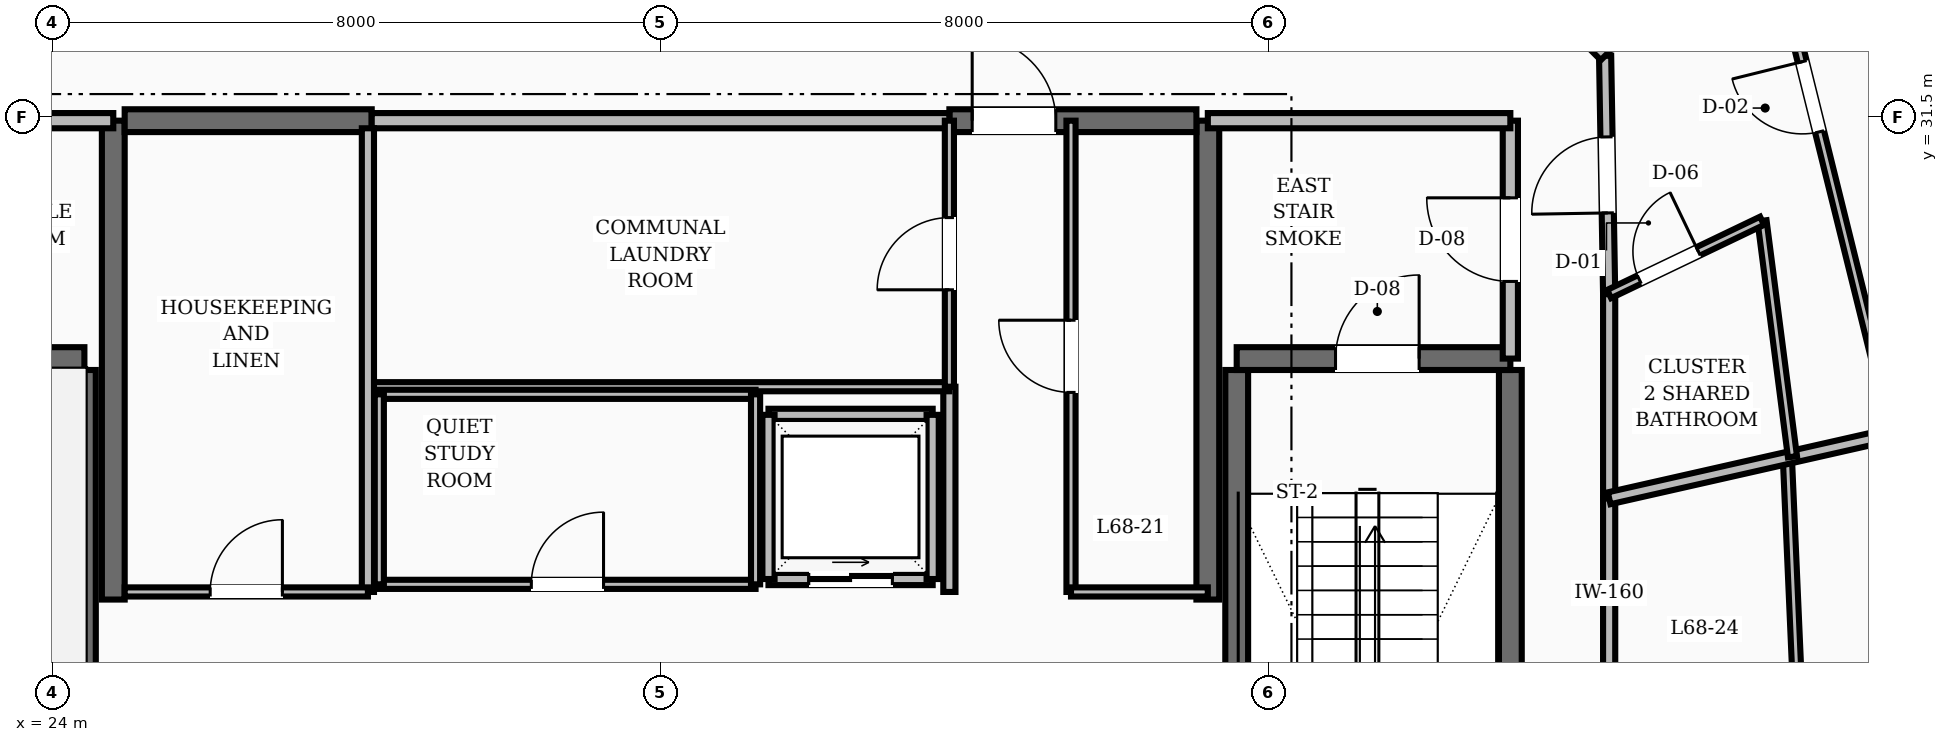
"""IFC4 building model, lengths in metres.
Left out: names, types, materials, properties, quantities, classifications, styles, units other than length and angle.
Written with IfcOpenShell. Run it as: python <this file> out.ifc"""

import sys

from ifc_helpers import new_model, si_unit, direction, frame, frame_2d, origin, place, context, subcontext, project, spatial, rectangle, extrude, element, fill, save


model = new_model("IFC4")
c1 = context("Model", 3, precision=1e-05, world=origin(), true_north=direction((0.0, 1.0)))
c2 = subcontext(c1, "Body", "Model", "MODEL_VIEW")
j1 = project(units=[si_unit("LENGTHUNIT", "METRE"), si_unit("PLANEANGLEUNIT", "RADIAN")], contexts=[c1])
p1 = place(None, origin())
s1 = spatial("IfcSite", under=j1, at=p1, CompositionType="ELEMENT")
p2 = place(p1, origin())
s2 = spatial("IfcBuilding", under=s1, at=p2, CompositionType="ELEMENT")
p3 = place(p2, frame((0.0, 0.0, 261.6)))
s3 = spatial("IfcBuildingStorey", under=s2, at=p3, CompositionType="ELEMENT", Elevation=261.6)
for number, where, z_axis, x_axis in (
    (1, (24.8, 25.15, 0.0), (0.0, 0.0, 1.0), (0.0, 1.0, 0.0)),
    (2, (39.2, 25.15, 0.0), (0.0, 0.0, 1.0), (0.0, 1.0, 0.0)),
):
    element("IfcWall", number, at=place(p3, frame(where, z_axis=z_axis, x_axis=x_axis)), inside=s3, PredefinedType="SHEAR", context=c2, shape_type="SweptSolid", body=[
        extrude(rectangle(XDim=6.3, YDim=0.3, at=frame_2d((3.15, 0.0))), origin(), (0.0, 0.0, 1.0), 3.6),
    ])
p4 = place(p3, frame((24.95, 31.45, 0.0), z_axis=(0.0, 0.0, 1.0), x_axis=(1.0, 0.0, 0.0)))
e3 = element("IfcWall", 3, at=p4, inside=s3, PredefinedType="SHEAR", context=c2, shape_type="SweptSolid", body=[
    extrude(rectangle(XDim=3.25, YDim=0.3, at=frame_2d((1.625, 0.0))), origin(), (0.0, 0.0, 1.0), 3.6),
])
p5 = place(p3, frame((35.8, 31.45, 0.0), z_axis=(0.0, 0.0, 1.0), x_axis=(1.0, 0.0, 0.0)))
e4 = element("IfcWall", 4, at=p5, inside=s3, PredefinedType="SHEAR", context=c2, shape_type="SweptSolid", body=[
    extrude(rectangle(XDim=3.25, YDim=0.3, at=frame_2d((1.625, 0.0))), origin(), (0.0, 0.0, 1.0), 3.6),
])
p6 = place(p5, frame((0.3, 0.0, 0.0)))
e5 = element("IfcOpeningElement", 5, at=p6, cuts=e4, PredefinedType="OPENING", context=c2, shape_type="SweptSolid", body=[
    extrude(rectangle(XDim=1.1, YDim=2.1, at=frame_2d((0.55, 1.05))), frame((0.0, 0.16, 0.0), z_axis=(0.0, -1.0, 0.0), x_axis=(1.0, 0.0, 0.0)), (0.0, 0.0, 1.0), 0.32),
])
p7 = place(p3, frame((24.42, 19.43, 0.0), z_axis=(0.0, 0.0, 1.0), x_axis=(0.0, 1.0, 0.0)))
e6 = element("IfcWall", 6, at=p7, inside=s3, PredefinedType="SHEAR", context=c2, shape_type="SweptSolid", body=[
    extrude(rectangle(XDim=8.74, YDim=0.3, at=frame_2d((4.37, 0.0))), origin(), (0.0, 0.0, 1.0), 3.6),
])
p8 = place(p3, frame((20.82, 28.32, 0.0), z_axis=(0.0, 0.0, 1.0), x_axis=(1.0, 0.0, 0.0)))
e7 = element("IfcWall", 7, at=p8, inside=s3, PredefinedType="SHEAR", context=c2, shape_type="SweptSolid", body=[
    extrude(rectangle(XDim=3.6, YDim=0.3, at=frame_2d((1.8, 0.0))), origin(), (0.0, 0.0, 1.0), 3.6),
])
for number, where, z_axis, x_axis in (
    (8, (43.18, 19.43, 0.0), (0.0, 0.0, 1.0), (0.0, 1.0, 0.0)),
    (9, (39.58, 19.43, 0.0), (0.0, 0.0, 1.0), (0.0, 1.0, 0.0)),
):
    element("IfcWall", number, at=place(p3, frame(where, z_axis=z_axis, x_axis=x_axis)), inside=s3, PredefinedType="SHEAR", context=c2, shape_type="SweptSolid", body=[
        extrude(rectangle(XDim=8.74, YDim=0.3, at=frame_2d((4.37, 0.0))), origin(), (0.0, 0.0, 1.0), 3.6),
    ])
p9 = place(p3, frame((39.58, 28.32, 0.0), z_axis=(0.0, 0.0, 1.0), x_axis=(1.0, 0.0, 0.0)))
e10 = element("IfcWall", 10, at=p9, inside=s3, PredefinedType="SHEAR", context=c2, shape_type="SweptSolid", body=[
    extrude(rectangle(XDim=3.6, YDim=0.3, at=frame_2d((1.8, 0.0))), origin(), (0.0, 0.0, 1.0), 3.6),
])
p10 = place(p9, frame((1.3, 0.0, 0.0)))
e11 = element("IfcOpeningElement", 11, at=p10, cuts=e10, PredefinedType="OPENING", context=c2, shape_type="SweptSolid", body=[
    extrude(rectangle(XDim=1.1, YDim=2.1, at=frame_2d((0.55, 1.05))), frame((0.0, 0.16, 0.0), z_axis=(0.0, -1.0, 0.0), x_axis=(1.0, 0.0, 0.0)), (0.0, 0.0, 1.0), 0.32),
])
p11 = place(p3, frame((43.18, 28.32, 0.0), z_axis=(0.0, 0.0, 1.0), x_axis=(0.0, 1.0, 0.0)))
e12 = element("IfcWall", 12, at=p11, inside=s3, PredefinedType="SOLIDWALL", context=c2, shape_type="SweptSolid", body=[
    extrude(rectangle(XDim=3.13, YDim=0.2, at=frame_2d((1.565, 0.0))), origin(), (0.0, 0.0, 1.0), 2.87),
])
p12 = place(p11, frame((1.015, 0.0, 0.0)))
e13 = element("IfcOpeningElement", 13, at=p12, cuts=e12, PredefinedType="OPENING", context=c2, shape_type="SweptSolid", body=[
    extrude(rectangle(XDim=1.1, YDim=2.1, at=frame_2d((0.55, 1.05))), frame((0.0, 0.11, 0.0), z_axis=(0.0, -1.0, 0.0), x_axis=(1.0, 0.0, 0.0)), (0.0, 0.0, 1.0), 0.22),
])
for number, where, z_axis, x_axis in (
    (14, (39.2, 31.45, 0.0), (0.0, 0.0, 1.0), (1.0, 0.0, 0.0)),
    (15, (20.82, 31.45, 0.0), (0.0, 0.0, 1.0), (1.0, 0.0, 0.0)),
):
    element("IfcWall", number, at=place(p3, frame(where, z_axis=z_axis, x_axis=x_axis)), inside=s3, PredefinedType="SOLIDWALL", context=c2, shape_type="SweptSolid", body=[
        extrude(rectangle(XDim=3.98, YDim=0.2, at=frame_2d((1.99, 0.0))), origin(), (0.0, 0.0, 1.0), 2.87),
    ])
p13 = place(p3, frame((35.8, 25.25, 0.0), z_axis=(0.0, 0.0, 1.0), x_axis=(0.0, 1.0, 0.0)))
e16 = element("IfcWall", 16, at=p13, inside=s3, PredefinedType="SOLIDWALL", context=c2, shape_type="SweptSolid", body=[
    extrude(rectangle(XDim=2.7, YDim=0.16, at=frame_2d((1.35, 0.0))), origin(), (0.0, 0.0, 1.0), 2.87),
])
p14 = place(p3, frame((33.42, 25.42, 0.0), z_axis=(0.0, 0.0, 1.0), x_axis=(1.0, 0.0, 0.0)))
e17 = element("IfcWall", 17, at=p14, inside=s3, PredefinedType="SOLIDWALL", context=c2, shape_type="SweptSolid", body=[
    extrude(rectangle(XDim=2.16, YDim=0.16, at=frame_2d((1.08, 0.0))), origin(), (0.0, 0.0, 1.0), 2.87),
])
p15 = place(p14, frame((0.53, 0.0, 0.0)))
e18 = element("IfcOpeningElement", 18, at=p15, cuts=e17, PredefinedType="OPENING", context=c2, shape_type="SweptSolid", body=[
    extrude(rectangle(XDim=1.1, YDim=2.15, at=frame_2d((0.55, 1.075))), frame((0.0, 0.09, 0.0), z_axis=(0.0, -1.0, 0.0), x_axis=(1.0, 0.0, 0.0)), (0.0, 0.0, 1.0), 0.18),
])
for number, where, z_axis, x_axis in (
    (19, (33.42, 27.58, 0.0), (0.0, 0.0, 1.0), (1.0, 0.0, 0.0)),
    (20, (33.42, 25.42, 0.0), (0.0, 0.0, 1.0), (0.0, 1.0, 0.0)),
    (21, (35.58, 25.42, 0.0), (0.0, 0.0, 1.0), (0.0, 1.0, 0.0)),
):
    element("IfcWall", number, at=place(p3, frame(where, z_axis=z_axis, x_axis=x_axis)), inside=s3, PredefinedType="SOLIDWALL", context=c2, shape_type="SweptSolid", body=[
        extrude(rectangle(XDim=2.16, YDim=0.16, at=frame_2d((1.08, 0.0))), origin(), (0.0, 0.0, 1.0), 2.87),
    ])
p16 = place(p3, frame((28.2, 31.45, 0.0), z_axis=(0.0, 0.0, 1.0), x_axis=(1.0, 0.0, 0.0)))
e22 = element("IfcWall", 22, at=p16, inside=s3, PredefinedType="SOLIDWALL", context=c2, shape_type="SweptSolid", body=[
    extrude(rectangle(XDim=7.6, YDim=0.2, at=frame_2d((3.8, 0.0))), origin(), (0.0, 0.0, 1.0), 2.87),
])
p17 = place(p3, frame((28.2, 27.95, 0.0), z_axis=(0.0, 0.0, 1.0), x_axis=(1.0, 0.0, 0.0)))
e23 = element("IfcWall", 23, at=p17, inside=s3, PredefinedType="PARTITIONING", context=c2, shape_type="SweptSolid", body=[
    extrude(rectangle(XDim=7.6, YDim=0.12, at=frame_2d((3.8, 0.0))), origin(), (0.0, 0.0, 1.0), 2.87),
])
p18 = place(p3, frame((35.8, 27.95, 0.0), z_axis=(0.0, 0.0, 1.0), x_axis=(0.0, 1.0, 0.0)))
e24 = element("IfcWall", 24, at=p18, inside=s3, PredefinedType="PARTITIONING", context=c2, shape_type="SweptSolid", body=[
    extrude(rectangle(XDim=3.5, YDim=0.12, at=frame_2d((1.75, 0.0))), origin(), (0.0, 0.0, 1.0), 2.87),
])
p19 = place(p18, frame((1.275, 0.0, 0.0)))
e25 = element("IfcOpeningElement", 25, at=p19, cuts=e24, PredefinedType="OPENING", context=c2, shape_type="SweptSolid", body=[
    extrude(rectangle(XDim=0.95, YDim=2.1, at=frame_2d((0.475, 1.05))), frame((0.0, 0.07, 0.0), z_axis=(0.0, -1.0, 0.0), x_axis=(1.0, 0.0, 0.0)), (0.0, 0.0, 1.0), 0.14),
])
p20 = place(p3, frame((28.3, 25.35, 0.0), z_axis=(0.0, 0.0, 1.0), x_axis=(1.0, 0.0, 0.0)))
e26 = element("IfcWall", 26, at=p20, inside=s3, PredefinedType="PARTITIONING", context=c2, shape_type="SweptSolid", body=[
    extrude(rectangle(XDim=4.95, YDim=0.12, at=frame_2d((2.475, 0.0))), origin(), (0.0, 0.0, 1.0), 2.87),
])
p21 = place(p20, frame((2.0, 0.0, 0.0)))
e27 = element("IfcOpeningElement", 27, at=p21, cuts=e26, PredefinedType="OPENING", context=c2, shape_type="SweptSolid", body=[
    extrude(rectangle(XDim=0.95, YDim=2.1, at=frame_2d((0.475, 1.05))), frame((0.0, 0.07, 0.0), z_axis=(0.0, -1.0, 0.0), x_axis=(1.0, 0.0, 0.0)), (0.0, 0.0, 1.0), 0.14),
])
p22 = place(p3, frame((28.3, 27.85, 0.0), z_axis=(0.0, 0.0, 1.0), x_axis=(1.0, 0.0, 0.0)))
e28 = element("IfcWall", 28, at=p22, inside=s3, PredefinedType="PARTITIONING", context=c2, shape_type="SweptSolid", body=[
    extrude(rectangle(XDim=4.95, YDim=0.12, at=frame_2d((2.475, 0.0))), origin(), (0.0, 0.0, 1.0), 2.87),
])
for number, where, z_axis, x_axis in (
    (29, (28.3, 25.35, 0.0), (0.0, 0.0, 1.0), (0.0, 1.0, 0.0)),
    (30, (33.25, 25.35, 0.0), (0.0, 0.0, 1.0), (0.0, 1.0, 0.0)),
):
    element("IfcWall", number, at=place(p3, frame(where, z_axis=z_axis, x_axis=x_axis)), inside=s3, PredefinedType="PARTITIONING", context=c2, shape_type="SweptSolid", body=[
        extrude(rectangle(XDim=2.5, YDim=0.12, at=frame_2d((1.25, 0.0))), origin(), (0.0, 0.0, 1.0), 2.87),
    ])
p23 = place(p3, frame((28.15, 25.25, 0.0), z_axis=(0.0, 0.0, 1.0), x_axis=(0.0, 1.0, 0.0)))
e31 = element("IfcWall", 31, at=p23, inside=s3, PredefinedType="SOLIDWALL", context=c2, shape_type="SweptSolid", body=[
    extrude(rectangle(XDim=6.1, YDim=0.16, at=frame_2d((3.05, 0.0))), origin(), (0.0, 0.0, 1.0), 2.87),
])
p24 = place(p3, frame((24.95, 25.25, 0.0), z_axis=(0.0, 0.0, 1.0), x_axis=(1.0, 0.0, 0.0)))
e32 = element("IfcWall", 32, at=p24, inside=s3, PredefinedType="PARTITIONING", context=c2, shape_type="SweptSolid", body=[
    extrude(rectangle(XDim=3.2, YDim=0.12, at=frame_2d((1.6, 0.0))), origin(), (0.0, 0.0, 1.0), 2.87),
])
p25 = place(p24, frame((1.125, 0.0, 0.0)))
e33 = element("IfcOpeningElement", 33, at=p25, cuts=e32, PredefinedType="OPENING", context=c2, shape_type="SweptSolid", body=[
    extrude(rectangle(XDim=0.95, YDim=2.1, at=frame_2d((0.475, 1.05))), frame((0.0, 0.07, 0.0), z_axis=(0.0, -1.0, 0.0), x_axis=(1.0, 0.0, 0.0)), (0.0, 0.0, 1.0), 0.14),
])
p26 = place(p3, frame((37.4, 25.25, 0.0), z_axis=(0.0, 0.0, 1.0), x_axis=(0.0, 1.0, 0.0)))
e34 = element("IfcWall", 34, at=p26, inside=s3, PredefinedType="PARTITIONING", context=c2, shape_type="SweptSolid", body=[
    extrude(rectangle(XDim=6.2, YDim=0.12, at=frame_2d((3.1, 0.0))), origin(), (0.0, 0.0, 1.0), 2.87),
])
p27 = place(p26, frame((2.625, 0.0, 0.0)))
e35 = element("IfcOpeningElement", 35, at=p27, cuts=e34, PredefinedType="OPENING", context=c2, shape_type="SweptSolid", body=[
    extrude(rectangle(XDim=0.95, YDim=2.1, at=frame_2d((0.475, 1.05))), frame((0.0, 0.07, 0.0), z_axis=(0.0, -1.0, 0.0), x_axis=(1.0, 0.0, 0.0)), (0.0, 0.0, 1.0), 0.14),
])
p28 = place(p3, frame((37.4, 25.25, 0.0), z_axis=(0.0, 0.0, 1.0), x_axis=(1.0, 0.0, 0.0)))
e36 = element("IfcWall", 36, at=p28, inside=s3, PredefinedType="PARTITIONING", context=c2, shape_type="SweptSolid", body=[
    extrude(rectangle(XDim=1.8, YDim=0.12, at=frame_2d((0.9, 0.0))), origin(), (0.0, 0.0, 1.0), 2.87),
])
p29 = place(p3, frame((44.48, 24.0, 0.0), z_axis=(0.0, 0.0, 1.0), x_axis=(0.0, 1.0, 0.0)))
e37 = element("IfcWall", 37, at=p29, inside=s3, PredefinedType="SOLIDWALL", context=c2, shape_type="SweptSolid", body=[
    extrude(rectangle(XDim=2.482, YDim=0.16, at=frame_2d((1.241, 0.0))), origin(), (0.0, 0.0, 1.0), 2.87),
])
p30 = place(p3, frame((44.48, 26.482, 0.0), z_axis=(0.0, 0.0, 1.0), x_axis=(0.0, 1.0, 0.0)))
e38 = element("IfcWall", 38, at=p30, inside=s3, PredefinedType="SOLIDWALL", context=c2, shape_type="SweptSolid", body=[
    extrude(rectangle(XDim=2.687, YDim=0.16, at=frame_2d((1.344, 0.0))), origin(), (0.0, 0.0, 1.0), 2.87),
])
p31 = place(p3, frame((44.48, 29.169, 0.0), z_axis=(0.0, 0.0, 1.0), x_axis=(-0.016981035134, 0.999855811828, 0.0)))
e39 = element("IfcWall", 39, at=p31, inside=s3, PredefinedType="SOLIDWALL", context=c2, shape_type="SweptSolid", body=[
    extrude(rectangle(XDim=3.134, YDim=0.16, at=frame_2d((1.567, 0.0))), origin(), (0.0, 0.0, 1.0), 2.87),
])
p32 = place(p31, frame((1.067, 0.0, 0.0)))
e40 = element("IfcOpeningElement", 40, at=p32, cuts=e39, PredefinedType="OPENING", context=c2, shape_type="SweptSolid", body=[
    extrude(rectangle(XDim=1.0, YDim=2.1, at=frame_2d((0.5, 1.05))), frame((0.0, 0.09, 0.0), z_axis=(0.0, -1.0, 0.0), x_axis=(1.0, 0.0, 0.0)), (0.0, 0.0, 1.0), 0.18),
])
p33 = place(p3, frame((44.427, 32.303, 0.0), z_axis=(0.0, 0.0, 1.0), x_axis=(-0.707106781187, 0.707106781187, 0.0)))
e41 = element("IfcWall", 41, at=p33, inside=s3, PredefinedType="SOLIDWALL", context=c2, shape_type="SweptSolid", body=[
    extrude(rectangle(XDim=2.916, YDim=0.16, at=frame_2d((1.458, 0.0))), origin(), (0.0, 0.0, 1.0), 2.87),
])
p34 = place(p3, frame((46.956, 24.0, 0.0), z_axis=(0.0, 0.0, 1.0), x_axis=(-0.043626899023, 0.999047893587, 0.0)))
e42 = element("IfcWall", 42, at=p34, inside=s3, PredefinedType="PARTITIONING", context=c2, shape_type="SweptSolid", body=[
    extrude(rectangle(XDim=3.016, YDim=0.12, at=frame_2d((1.508, 0.0))), origin(), (0.0, 0.0, 1.0), 2.87),
])
p35 = place(p3, frame((44.48, 26.482, 0.0), z_axis=(0.0, 0.0, 1.0), x_axis=(0.975303841196, 0.220867420298, 0.0)))
e43 = element("IfcWall", 43, at=p35, inside=s3, PredefinedType="SOLIDWALL", context=c2, shape_type="SweptSolid", body=[
    extrude(rectangle(XDim=6.819, YDim=0.16, at=frame_2d((3.41, 0.0))), origin(), (0.0, 0.0, 1.0), 2.87),
])
p36 = place(p3, frame((46.892, 27.029, 0.0), z_axis=(0.0, 0.0, 1.0), x_axis=(-0.127998561857, 0.991774353451, 0.0)))
e44 = element("IfcWall", 44, at=p36, inside=s3, PredefinedType="PARTITIONING", context=c2, shape_type="SweptSolid", body=[
    extrude(rectangle(XDim=3.13, YDim=0.12, at=frame_2d((1.565, 0.0))), origin(), (0.0, 0.0, 1.0), 2.87),
])
p37 = place(p3, frame((44.48, 29.169, 0.0), z_axis=(0.0, 0.0, 1.0), x_axis=(0.901874681434, 0.431997753452, 0.0)))
e45 = element("IfcWall", 45, at=p37, inside=s3, PredefinedType="PARTITIONING", context=c2, shape_type="SweptSolid", body=[
    extrude(rectangle(XDim=2.23, YDim=0.12, at=frame_2d((1.115, 0.0))), origin(), (0.0, 0.0, 1.0), 2.87),
])
p38 = place(p37, frame((0.44, 0.0, 0.0)))
e46 = element("IfcOpeningElement", 46, at=p38, cuts=e45, PredefinedType="OPENING", context=c2, shape_type="SweptSolid", body=[
    extrude(rectangle(XDim=0.86, YDim=2.1, at=frame_2d((0.43, 1.05))), frame((0.0, 0.07, 0.0), z_axis=(0.0, -1.0, 0.0), x_axis=(1.0, 0.0, 0.0)), (0.0, 0.0, 1.0), 0.14),
])
p39 = place(p3, frame((48.232, 27.332, 0.0), z_axis=(0.0, 0.0, 1.0), x_axis=(-0.240321088177, 0.970693450363, 0.0)))
e47 = element("IfcWall", 47, at=p39, inside=s3, PredefinedType="PARTITIONING", context=c2, shape_type="SweptSolid", body=[
    extrude(rectangle(XDim=6.902, YDim=0.12, at=frame_2d((3.451, 0.0))), origin(), (0.0, 0.0, 1.0), 2.87),
])
p40 = place(p39, frame((4.092, 0.0, 0.0)))
e48 = element("IfcOpeningElement", 48, at=p40, cuts=e47, PredefinedType="OPENING", context=c2, shape_type="SweptSolid", body=[
    extrude(rectangle(XDim=0.95, YDim=2.1, at=frame_2d((0.475, 1.05))), frame((0.0, 0.07, 0.0), z_axis=(0.0, -1.0, 0.0), x_axis=(1.0, 0.0, 0.0)), (0.0, 0.0, 1.0), 0.14),
])
p41 = place(p10, origin())
e49 = element("IfcDoor", 49, at=p41, inside=s3, OperationType="SINGLE_SWING_RIGHT", PredefinedType="DOOR", context=c2, shape_type="SweptSolid", body=[
    extrude(rectangle(XDim=1.1, YDim=2.1, at=frame_2d((0.55, 1.05))), frame((0.0, 0.025, 0.0), z_axis=(0.0, -1.0, 0.0), x_axis=(1.0, 0.0, 0.0)), (0.0, 0.0, 1.0), 0.05),
])
fill(e11, e49)
p42 = place(p12, origin())
e50 = element("IfcDoor", 50, at=p42, inside=s3, OperationType="SINGLE_SWING_RIGHT", PredefinedType="DOOR", context=c2, shape_type="SweptSolid", body=[
    extrude(rectangle(XDim=1.1, YDim=2.1, at=frame_2d((0.55, 1.05))), frame((0.0, 0.025, 0.0), z_axis=(0.0, -1.0, 0.0), x_axis=(1.0, 0.0, 0.0)), (0.0, 0.0, 1.0), 0.05),
])
fill(e13, e50)
p43 = place(p6, origin())
e51 = element("IfcDoor", 51, at=p43, inside=s3, OperationType="SINGLE_SWING_LEFT", PredefinedType="DOOR", context=c2, shape_type="SweptSolid", body=[
    extrude(rectangle(XDim=1.1, YDim=2.1, at=frame_2d((0.55, 1.05))), frame((0.0, 0.025, 0.0), z_axis=(0.0, -1.0, 0.0), x_axis=(1.0, 0.0, 0.0)), (0.0, 0.0, 1.0), 0.05),
])
fill(e5, e51)
p44 = place(p15, origin())
e52 = element("IfcDoor", 52, at=p44, inside=s3, OperationType="SLIDING_TO_RIGHT", PredefinedType="DOOR", context=c2, shape_type="SweptSolid", body=[
    extrude(rectangle(XDim=1.1, YDim=2.15, at=frame_2d((0.55, 1.075))), frame((0.0, 0.025, 0.0), z_axis=(0.0, -1.0, 0.0), x_axis=(1.0, 0.0, 0.0)), (0.0, 0.0, 1.0), 0.05),
])
fill(e18, e52)
p45 = place(p19, origin())
e53 = element("IfcDoor", 53, at=p45, inside=s3, OperationType="SINGLE_SWING_LEFT", PredefinedType="DOOR", context=c2, shape_type="SweptSolid", body=[
    extrude(rectangle(XDim=0.95, YDim=2.1, at=frame_2d((0.475, 1.05))), frame((0.0, 0.025, 0.0), z_axis=(0.0, -1.0, 0.0), x_axis=(1.0, 0.0, 0.0)), (0.0, 0.0, 1.0), 0.05),
])
fill(e25, e53)
p46 = place(p21, origin())
e54 = element("IfcDoor", 54, at=p46, inside=s3, OperationType="SINGLE_SWING_RIGHT", PredefinedType="DOOR", context=c2, shape_type="SweptSolid", body=[
    extrude(rectangle(XDim=0.95, YDim=2.1, at=frame_2d((0.475, 1.05))), frame((0.0, 0.025, 0.0), z_axis=(0.0, -1.0, 0.0), x_axis=(1.0, 0.0, 0.0)), (0.0, 0.0, 1.0), 0.05),
])
fill(e27, e54)
p47 = place(p25, origin())
e55 = element("IfcDoor", 55, at=p47, inside=s3, OperationType="SINGLE_SWING_RIGHT", PredefinedType="DOOR", context=c2, shape_type="SweptSolid", body=[
    extrude(rectangle(XDim=0.95, YDim=2.1, at=frame_2d((0.475, 1.05))), frame((0.0, 0.025, 0.0), z_axis=(0.0, -1.0, 0.0), x_axis=(1.0, 0.0, 0.0)), (0.0, 0.0, 1.0), 0.05),
])
fill(e33, e55)
p48 = place(p27, origin())
e56 = element("IfcDoor", 56, at=p48, inside=s3, OperationType="SINGLE_SWING_RIGHT", PredefinedType="DOOR", context=c2, shape_type="SweptSolid", body=[
    extrude(rectangle(XDim=0.95, YDim=2.1, at=frame_2d((0.475, 1.05))), frame((0.0, 0.025, 0.0), z_axis=(0.0, -1.0, 0.0), x_axis=(1.0, 0.0, 0.0)), (0.0, 0.0, 1.0), 0.05),
])
fill(e35, e56)
p49 = place(p38, origin())
e57 = element("IfcDoor", 57, at=p49, inside=s3, OperationType="SINGLE_SWING_RIGHT", PredefinedType="DOOR", context=c2, shape_type="SweptSolid", body=[
    extrude(rectangle(XDim=0.86, YDim=2.1, at=frame_2d((0.43, 1.05))), frame((0.0, 0.025, 0.0), z_axis=(0.0, -1.0, 0.0), x_axis=(1.0, 0.0, 0.0)), (0.0, 0.0, 1.0), 0.05),
])
fill(e46, e57)
p50 = place(p32, origin())
e58 = element("IfcDoor", 58, at=p50, inside=s3, OperationType="SINGLE_SWING_LEFT", PredefinedType="DOOR", context=c2, shape_type="SweptSolid", body=[
    extrude(rectangle(XDim=1.0, YDim=2.1, at=frame_2d((0.5, 1.05))), frame((0.0, 0.025, 0.0), z_axis=(0.0, -1.0, 0.0), x_axis=(1.0, 0.0, 0.0)), (0.0, 0.0, 1.0), 0.05),
])
fill(e40, e58)
p51 = place(p40, origin())
e59 = element("IfcDoor", 59, at=p51, inside=s3, OperationType="SINGLE_SWING_RIGHT", PredefinedType="DOOR", context=c2, shape_type="SweptSolid", body=[
    extrude(rectangle(XDim=0.95, YDim=2.1, at=frame_2d((0.475, 1.05))), frame((0.0, 0.025, 0.0), z_axis=(0.0, -1.0, 0.0), x_axis=(1.0, 0.0, 0.0)), (0.0, 0.0, 1.0), 0.05),
])
fill(e48, e59)
save(model, sys.argv[1])
